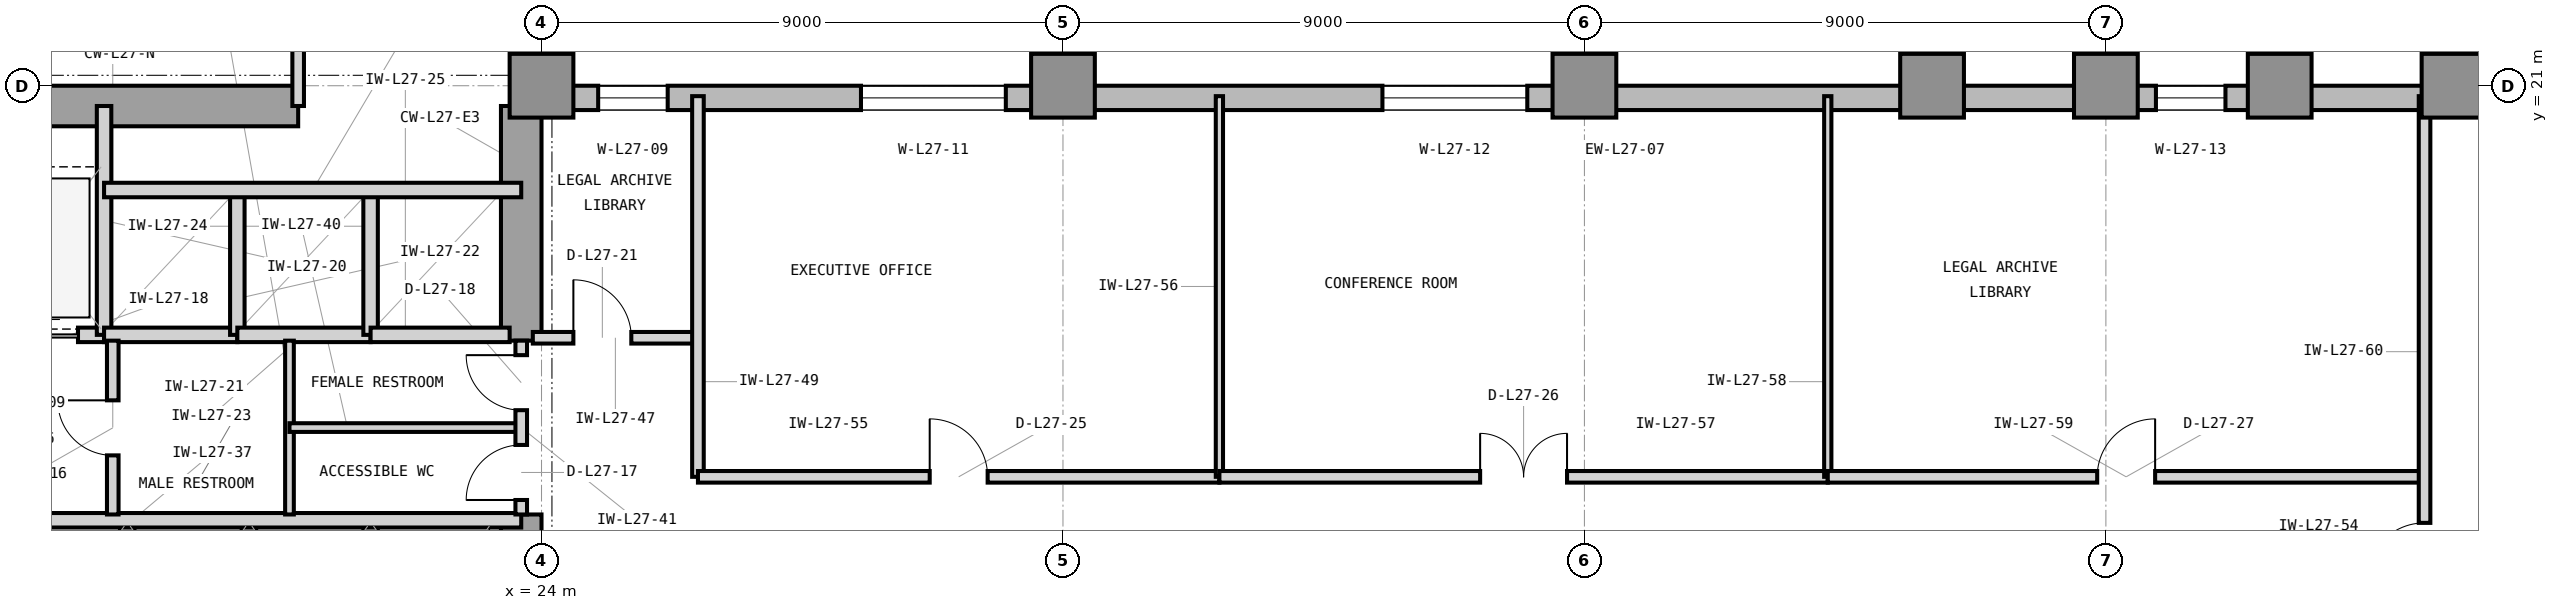
"""IFC4 building model, lengths in metres.
Left out: names, types, materials, properties, quantities, classifications, styles, units other than length and angle.
Written with IfcOpenShell. Run it as: python <this file> out.ifc"""

import sys

from ifc_helpers import new_model, si_unit, direction, frame, frame_2d, origin, origin_2d, place, context, subcontext, project, spatial, rectangle, extrude, element, fill, save


model = new_model("IFC4")
c1 = context("Model", 3, precision=1e-05, world=origin(), true_north=direction((0.0, 1.0)))
c2 = subcontext(c1, "Body", "Model", "MODEL_VIEW")
j1 = project(units=[si_unit("LENGTHUNIT", "METRE"), si_unit("PLANEANGLEUNIT", "RADIAN")], contexts=[c1])
p1 = place(None, origin())
s1 = spatial("IfcSite", under=j1, at=p1, CompositionType="ELEMENT")
p2 = place(p1, origin())
s2 = spatial("IfcBuilding", under=s1, at=p2, CompositionType="ELEMENT")
p3 = place(p2, frame((0.0, 0.0, 116.7)))
s3 = spatial("IfcBuildingStorey", under=s2, at=p3, CompositionType="ELEMENT", Elevation=116.7)
p4 = place(p3, frame((7.475, 20.65, 0.0), z_axis=(0.0, 0.0, 1.0), x_axis=(1.0, 0.0, 0.0)))
e1 = element("IfcWall", 1, at=p4, inside=s3, PredefinedType="SHEAR", context=c2, shape_type="SweptSolid", body=[
    extrude(rectangle(XDim=12.325, YDim=0.7, at=frame_2d((6.163, 0.0))), origin(), (0.0, 0.0, 1.0), 3.9),
])
p5 = place(p3, frame((23.65, 10.4, 0.0), z_axis=(0.0, 0.0, 1.0), x_axis=(0.0, 1.0, 0.0)))
e2 = element("IfcWall", 2, at=p5, inside=s3, PredefinedType="SHEAR", context=c2, shape_type="SweptSolid", body=[
    extrude(rectangle(XDim=3.2, YDim=0.7, at=frame_2d((1.6, 0.0))), origin(), (0.0, 0.0, 1.0), 3.9),
])
p6 = place(p3, frame((23.65, 16.6, 0.0), z_axis=(0.0, 0.0, 1.0), x_axis=(0.0, 1.0, 0.0)))
e3 = element("IfcWall", 3, at=p6, inside=s3, PredefinedType="SHEAR", context=c2, shape_type="SweptSolid", body=[
    extrude(rectangle(XDim=4.05, YDim=0.7, at=frame_2d((2.025, 0.0))), origin(), (0.0, 0.0, 1.0), 3.9),
])
for number, where, z_axis, x_axis in (
    (4, (24.0, 21.0, 0.0), (0.0, 0.0, 1.0), (1.0, 0.0, 0.0)),
    (5, (33.0, 21.0, 0.0), (0.0, 0.0, 1.0), (1.0, 0.0, 0.0)),
    (6, (42.0, 21.0, 0.0), (0.0, 0.0, 1.0), (1.0, 0.0, 0.0)),
    (7, (48.0, 21.0, 0.0), (0.0, 0.0, 1.0), (1.0, 0.0, 0.0)),
    (8, (51.0, 21.0, 0.0), (0.0, 0.0, 1.0), (1.0, 0.0, 0.0)),
    (9, (54.0, 21.0, 0.0), (0.0, 0.0, 1.0), (1.0, 0.0, 0.0)),
    (10, (57.0, 21.0, 0.0), (0.0, 0.0, 1.0), (1.0, 0.0, 0.0)),
):
    element("IfcColumn", number, at=place(p3, frame(where, z_axis=z_axis, x_axis=x_axis)), inside=s3, PredefinedType="COLUMN", context=c2, shape_type="SweptSolid", body=[
        extrude(rectangle(XDim=1.1, YDim=1.1, at=origin_2d()), origin(), (0.0, 0.0, 1.0), 3.9),
    ])
p7 = place(p3, frame((61.4, 20.79, 0.0), z_axis=(0.0, 0.0, 1.0), x_axis=(-1.0, 0.0, 0.0)))
e11 = element("IfcWall", 11, at=p7, inside=s3, PredefinedType="STANDARD", context=c2, shape_type="SweptSolid", body=[
    extrude(rectangle(XDim=37.4, YDim=0.42, at=frame_2d((18.7, 0.0))), origin(), (0.0, 0.0, 1.0), 3.7),
])
p8 = place(p7, frame((35.222, 0.0, 0.85)))
e12 = element("IfcOpeningElement", 12, at=p8, cuts=e11, PredefinedType="OPENING", context=c2, shape_type="SweptSolid", body=[
    extrude(rectangle(XDim=1.2, YDim=2.25, at=frame_2d((0.6, 1.125))), frame((0.0, 0.22, 0.0), z_axis=(0.0, -1.0, 0.0), x_axis=(1.0, 0.0, 0.0)), (0.0, 0.0, 1.0), 0.44),
])
p9 = place(p7, frame((29.386, 0.0, 0.85)))
e13 = element("IfcOpeningElement", 13, at=p9, cuts=e11, PredefinedType="OPENING", context=c2, shape_type="SweptSolid", body=[
    extrude(rectangle(XDim=2.5, YDim=2.25, at=frame_2d((1.25, 1.125))), frame((0.0, 0.22, 0.0), z_axis=(0.0, -1.0, 0.0), x_axis=(1.0, 0.0, 0.0)), (0.0, 0.0, 1.0), 0.44),
])
p10 = place(p7, frame((20.386, 0.0, 0.85)))
e14 = element("IfcOpeningElement", 14, at=p10, cuts=e11, PredefinedType="OPENING", context=c2, shape_type="SweptSolid", body=[
    extrude(rectangle(XDim=2.5, YDim=2.25, at=frame_2d((1.25, 1.125))), frame((0.0, 0.22, 0.0), z_axis=(0.0, -1.0, 0.0), x_axis=(1.0, 0.0, 0.0)), (0.0, 0.0, 1.0), 0.44),
])
p11 = place(p7, frame((8.336, 0.0, 0.85)))
e15 = element("IfcOpeningElement", 15, at=p11, cuts=e11, PredefinedType="OPENING", context=c2, shape_type="SweptSolid", body=[
    extrude(rectangle(XDim=1.2, YDim=2.25, at=frame_2d((0.6, 1.125))), frame((0.0, 0.22, 0.0), z_axis=(0.0, -1.0, 0.0), x_axis=(1.0, 0.0, 0.0)), (0.0, 0.0, 1.0), 0.44),
])
p12 = place(p3, frame((23.79, 21.0, 0.0), z_axis=(0.0, 0.0, 1.0), x_axis=(0.0, 1.0, 0.0)))
e16 = element("IfcWall", 16, at=p12, inside=s3, PredefinedType="STANDARD", context=c2, shape_type="SweptSolid", body=[
    extrude(rectangle(XDim=25.4, YDim=0.42, at=frame_2d((12.7, 0.0))), origin(), (0.0, 0.0, 1.0), 3.7),
])
p13 = place(p12, frame((11.45, 0.0, 0.85)))
e17 = element("IfcOpeningElement", 17, at=p13, cuts=e16, PredefinedType="OPENING", context=c2, shape_type="SweptSolid", body=[
    extrude(rectangle(XDim=2.5, YDim=2.25, at=frame_2d((1.25, 1.125))), frame((0.0, 0.22, 0.0), z_axis=(0.0, -1.0, 0.0), x_axis=(1.0, 0.0, 0.0)), (0.0, 0.0, 1.0), 0.44),
])
p14 = place(p3, frame((14.15, 16.7, 0.0), z_axis=(0.0, 0.0, 1.0), x_axis=(1.0, 0.0, 0.0)))
e18 = element("IfcWall", 18, at=p14, inside=s3, PredefinedType="PARTITIONING", context=c2, shape_type="SweptSolid", body=[
    extrude(rectangle(XDim=2.3, YDim=0.25, at=frame_2d((1.15, 0.0))), origin(), (0.0, 0.0, 1.0), 3.227),
])
p15 = place(p14, frame((0.45, 0.0, 0.0)))
e19 = element("IfcOpeningElement", 19, at=p15, cuts=e18, PredefinedType="OPENING", context=c2, shape_type="SweptSolid", body=[
    extrude(rectangle(XDim=1.4, YDim=2.35, at=frame_2d((0.7, 1.175))), frame((0.0, 0.135, 0.0), z_axis=(0.0, -1.0, 0.0), x_axis=(1.0, 0.0, 0.0)), (0.0, 0.0, 1.0), 0.27),
])
p16 = place(p3, frame((16.45, 16.7, 0.0), z_axis=(0.0, 0.0, 1.0), x_axis=(0.0, 1.0, 0.0)))
e20 = element("IfcWall", 20, at=p16, inside=s3, PredefinedType="PARTITIONING", context=c2, shape_type="SweptSolid", body=[
    extrude(rectangle(XDim=3.95, YDim=0.25, at=frame_2d((1.975, 0.0))), origin(), (0.0, 0.0, 1.0), 3.69),
])
p17 = place(p3, frame((16.45, 16.7, 0.0), z_axis=(0.0, 0.0, 1.0), x_axis=(1.0, 0.0, 0.0)))
e21 = element("IfcWall", 21, at=p17, inside=s3, PredefinedType="PARTITIONING", context=c2, shape_type="SweptSolid", body=[
    extrude(rectangle(XDim=2.3, YDim=0.25, at=frame_2d((1.15, 0.0))), origin(), (0.0, 0.0, 1.0), 3.227),
])
p18 = place(p3, frame((18.75, 16.7, 0.0), z_axis=(0.0, 0.0, 1.0), x_axis=(0.0, 1.0, 0.0)))
e22 = element("IfcWall", 22, at=p18, inside=s3, PredefinedType="PARTITIONING", context=c2, shape_type="SweptSolid", body=[
    extrude(rectangle(XDim=2.5, YDim=0.25, at=frame_2d((1.25, 0.0))), origin(), (0.0, 0.0, 1.0), 3.69),
])
p19 = place(p3, frame((18.75, 16.7, 0.0), z_axis=(0.0, 0.0, 1.0), x_axis=(1.0, 0.0, 0.0)))
e23 = element("IfcWall", 23, at=p19, inside=s3, PredefinedType="PARTITIONING", context=c2, shape_type="SweptSolid", body=[
    extrude(rectangle(XDim=2.3, YDim=0.25, at=frame_2d((1.15, 0.0))), origin(), (0.0, 0.0, 1.0), 3.227),
])
p20 = place(p3, frame((21.05, 16.7, 0.0), z_axis=(0.0, 0.0, 1.0), x_axis=(0.0, 1.0, 0.0)))
e24 = element("IfcWall", 24, at=p20, inside=s3, PredefinedType="PARTITIONING", context=c2, shape_type="SweptSolid", body=[
    extrude(rectangle(XDim=2.5, YDim=0.25, at=frame_2d((1.25, 0.0))), origin(), (0.0, 0.0, 1.0), 3.69),
])
p21 = place(p3, frame((21.05, 16.7, 0.0), z_axis=(0.0, 0.0, 1.0), x_axis=(1.0, 0.0, 0.0)))
e25 = element("IfcWall", 25, at=p21, inside=s3, PredefinedType="PARTITIONING", context=c2, shape_type="SweptSolid", body=[
    extrude(rectangle(XDim=2.4, YDim=0.25, at=frame_2d((1.2, 0.0))), origin(), (0.0, 0.0, 1.0), 3.227),
])
p22 = place(p3, frame((16.45, 19.2, 0.0), z_axis=(0.0, 0.0, 1.0), x_axis=(1.0, 0.0, 0.0)))
e26 = element("IfcWall", 26, at=p22, inside=s3, PredefinedType="PARTITIONING", context=c2, shape_type="SweptSolid", body=[
    extrude(rectangle(XDim=7.2, YDim=0.25, at=frame_2d((3.6, 0.0))), origin(), (0.0, 0.0, 1.0), 3.69),
])
for number, where, z_axis, x_axis in (
    (27, (16.85, 10.5, 0.0), (0.0, 0.0, 1.0), (0.0, 1.0, 0.0)),
    (28, (18.95, 10.5, 0.0), (0.0, 0.0, 1.0), (0.0, 1.0, 0.0)),
    (29, (21.05, 10.5, 0.0), (0.0, 0.0, 1.0), (0.0, 1.0, 0.0)),
):
    element("IfcWall", number, at=place(p3, frame(where, z_axis=z_axis, x_axis=x_axis)), inside=s3, PredefinedType="PARTITIONING", context=c2, shape_type="SweptSolid", body=[
        extrude(rectangle(XDim=3.0, YDim=0.25, at=frame_2d((1.5, 0.0))), origin(), (0.0, 0.0, 1.0), 3.69),
    ])
p23 = place(p3, frame((14.7, 13.5, 0.0), z_axis=(0.0, 0.0, 1.0), x_axis=(1.0, 0.0, 0.0)))
e30 = element("IfcWall", 30, at=p23, inside=s3, PredefinedType="PARTITIONING", context=c2, shape_type="SweptSolid", body=[
    extrude(rectangle(XDim=8.95, YDim=0.25, at=frame_2d((4.475, 0.0))), origin(), (0.0, 0.0, 1.0), 3.227),
])
p24 = place(p3, frame((16.6, 13.6, 0.0), z_axis=(0.0, 0.0, 1.0), x_axis=(0.0, 1.0, 0.0)))
e31 = element("IfcWall", 31, at=p24, inside=s3, PredefinedType="PARTITIONING", context=c2, shape_type="SweptSolid", body=[
    extrude(rectangle(XDim=3.0, YDim=0.2, at=frame_2d((1.5, 0.0))), origin(), (0.0, 0.0, 1.0), 3.69),
])
p25 = place(p24, frame((1.02, 0.0, 0.0)))
e32 = element("IfcOpeningElement", 32, at=p25, cuts=e31, PredefinedType="OPENING", context=c2, shape_type="SweptSolid", body=[
    extrude(rectangle(XDim=0.95, YDim=2.1, at=frame_2d((0.475, 1.05))), frame((0.0, 0.11, 0.0), z_axis=(0.0, -1.0, 0.0), x_axis=(1.0, 0.0, 0.0)), (0.0, 0.0, 1.0), 0.22),
])
p26 = place(p3, frame((19.65, 13.6, 0.0), z_axis=(0.0, 0.0, 1.0), x_axis=(0.0, 1.0, 0.0)))
e33 = element("IfcWall", 33, at=p26, inside=s3, PredefinedType="PARTITIONING", context=c2, shape_type="SweptSolid", body=[
    extrude(rectangle(XDim=3.0, YDim=0.15, at=frame_2d((1.5, 0.0))), origin(), (0.0, 0.0, 1.0), 3.69),
])
p27 = place(p3, frame((19.65, 15.1, 0.0), z_axis=(0.0, 0.0, 1.0), x_axis=(1.0, 0.0, 0.0)))
e34 = element("IfcWall", 34, at=p27, inside=s3, PredefinedType="PARTITIONING", context=c2, shape_type="SweptSolid", body=[
    extrude(rectangle(XDim=4.0, YDim=0.15, at=frame_2d((2.0, 0.0))), origin(), (0.0, 0.0, 1.0), 3.69),
])
p28 = place(p3, frame((23.65, 13.6, 0.0), z_axis=(0.0, 0.0, 1.0), x_axis=(0.0, 1.0, 0.0)))
e35 = element("IfcWall", 35, at=p28, inside=s3, PredefinedType="PARTITIONING", context=c2, shape_type="SweptSolid", body=[
    extrude(rectangle(XDim=3.0, YDim=0.2, at=frame_2d((1.5, 0.0))), origin(), (0.0, 0.0, 1.0), 3.69),
])
p29 = place(p28, frame((0.25, 0.0, 0.0)))
e36 = element("IfcOpeningElement", 36, at=p29, cuts=e35, PredefinedType="OPENING", context=c2, shape_type="SweptSolid", body=[
    extrude(rectangle(XDim=0.95, YDim=2.1, at=frame_2d((0.475, 1.05))), frame((0.0, 0.11, 0.0), z_axis=(0.0, -1.0, 0.0), x_axis=(1.0, 0.0, 0.0)), (0.0, 0.0, 1.0), 0.22),
])
p30 = place(p28, frame((1.8, 0.0, 0.0)))
e37 = element("IfcOpeningElement", 37, at=p30, cuts=e35, PredefinedType="OPENING", context=c2, shape_type="SweptSolid", body=[
    extrude(rectangle(XDim=0.95, YDim=2.1, at=frame_2d((0.475, 1.05))), frame((0.0, 0.11, 0.0), z_axis=(0.0, -1.0, 0.0), x_axis=(1.0, 0.0, 0.0)), (0.0, 0.0, 1.0), 0.22),
])
p31 = place(p3, frame((23.85, 16.65, 0.0), z_axis=(0.0, 0.0, 1.0), x_axis=(1.0, 0.0, 0.0)))
e38 = element("IfcWall", 38, at=p31, inside=s3, PredefinedType="PARTITIONING", context=c2, shape_type="SweptSolid", body=[
    extrude(rectangle(XDim=2.85, YDim=0.2, at=frame_2d((1.425, 0.0))), origin(), (0.0, 0.0, 1.0), 3.69),
])
p32 = place(p31, frame((0.7, 0.0, 0.0)))
e39 = element("IfcOpeningElement", 39, at=p32, cuts=e38, PredefinedType="OPENING", context=c2, shape_type="SweptSolid", body=[
    extrude(rectangle(XDim=1.0, YDim=2.15, at=frame_2d((0.5, 1.075))), frame((0.0, 0.11, 0.0), z_axis=(0.0, -1.0, 0.0), x_axis=(1.0, 0.0, 0.0)), (0.0, 0.0, 1.0), 0.22),
])
p33 = place(p3, frame((26.7, 14.25, 0.0), z_axis=(0.0, 0.0, 1.0), x_axis=(0.0, 1.0, 0.0)))
e40 = element("IfcWall", 40, at=p33, inside=s3, PredefinedType="PARTITIONING", context=c2, shape_type="SweptSolid", body=[
    extrude(rectangle(XDim=6.57, YDim=0.2, at=frame_2d((3.285, 0.0))), origin(), (0.0, 0.0, 1.0), 3.69),
])
p34 = place(p3, frame((26.7, 14.25, 0.0), z_axis=(0.0, 0.0, 1.0), x_axis=(1.0, 0.0, 0.0)))
e41 = element("IfcWall", 41, at=p34, inside=s3, PredefinedType="PARTITIONING", context=c2, shape_type="SweptSolid", body=[
    extrude(rectangle(XDim=9.0, YDim=0.2, at=frame_2d((4.5, 0.0))), origin(), (0.0, 0.0, 1.0), 3.69),
])
p35 = place(p34, frame((4.0, 0.0, 0.0)))
e42 = element("IfcOpeningElement", 42, at=p35, cuts=e41, PredefinedType="OPENING", context=c2, shape_type="SweptSolid", body=[
    extrude(rectangle(XDim=1.0, YDim=2.15, at=frame_2d((0.5, 1.075))), frame((0.0, 0.11, 0.0), z_axis=(0.0, -1.0, 0.0), x_axis=(1.0, 0.0, 0.0)), (0.0, 0.0, 1.0), 0.22),
])
p36 = place(p3, frame((35.7, 14.25, 0.0), z_axis=(0.0, 0.0, 1.0), x_axis=(0.0, 1.0, 0.0)))
e43 = element("IfcWall", 43, at=p36, inside=s3, PredefinedType="PARTITIONING", context=c2, shape_type="SweptSolid", body=[
    extrude(rectangle(XDim=6.57, YDim=0.125, at=frame_2d((3.285, 0.0))), origin(), (0.0, 0.0, 1.0), 3.69),
])
p37 = place(p3, frame((35.7, 14.25, 0.0), z_axis=(0.0, 0.0, 1.0), x_axis=(1.0, 0.0, 0.0)))
e44 = element("IfcWall", 44, at=p37, inside=s3, PredefinedType="PARTITIONING", context=c2, shape_type="SweptSolid", body=[
    extrude(rectangle(XDim=10.5, YDim=0.2, at=frame_2d((5.25, 0.0))), origin(), (0.0, 0.0, 1.0), 3.69),
])
p38 = place(p37, frame((4.5, 0.0, 0.0)))
e45 = element("IfcOpeningElement", 45, at=p38, cuts=e44, PredefinedType="OPENING", context=c2, shape_type="SweptSolid", body=[
    extrude(rectangle(XDim=1.5, YDim=2.3, at=frame_2d((0.75, 1.15))), frame((0.0, 0.11, 0.0), z_axis=(0.0, -1.0, 0.0), x_axis=(1.0, 0.0, 0.0)), (0.0, 0.0, 1.0), 0.22),
])
p39 = place(p3, frame((46.2, 14.25, 0.0), z_axis=(0.0, 0.0, 1.0), x_axis=(0.0, 1.0, 0.0)))
e46 = element("IfcWall", 46, at=p39, inside=s3, PredefinedType="PARTITIONING", context=c2, shape_type="SweptSolid", body=[
    extrude(rectangle(XDim=6.57, YDim=0.125, at=frame_2d((3.285, 0.0))), origin(), (0.0, 0.0, 1.0), 3.69),
])
p40 = place(p3, frame((46.2, 14.25, 0.0), z_axis=(0.0, 0.0, 1.0), x_axis=(1.0, 0.0, 0.0)))
e47 = element("IfcWall", 47, at=p40, inside=s3, PredefinedType="PARTITIONING", context=c2, shape_type="SweptSolid", body=[
    extrude(rectangle(XDim=10.3, YDim=0.2, at=frame_2d((5.15, 0.0))), origin(), (0.0, 0.0, 1.0), 3.69),
])
p41 = place(p40, frame((4.65, 0.0, 0.0)))
e48 = element("IfcOpeningElement", 48, at=p41, cuts=e47, PredefinedType="OPENING", context=c2, shape_type="SweptSolid", body=[
    extrude(rectangle(XDim=1.0, YDim=2.15, at=frame_2d((0.5, 1.075))), frame((0.0, 0.11, 0.0), z_axis=(0.0, -1.0, 0.0), x_axis=(1.0, 0.0, 0.0)), (0.0, 0.0, 1.0), 0.22),
])
p42 = place(p3, frame((56.5, 3.18, 0.0), z_axis=(0.0, 0.0, 1.0), x_axis=(0.0, 1.0, 0.0)))
e49 = element("IfcWall", 49, at=p42, inside=s3, PredefinedType="PARTITIONING", context=c2, shape_type="SweptSolid", body=[
    extrude(rectangle(XDim=17.64, YDim=0.2, at=frame_2d((8.82, 0.0))), origin(), (0.0, 0.0, 1.0), 3.69),
])
p43 = place(p42, frame((9.275, 0.0, 0.0)))
e50 = element("IfcOpeningElement", 50, at=p43, cuts=e49, PredefinedType="OPENING", context=c2, shape_type="SweptSolid", body=[
    extrude(rectangle(XDim=1.0, YDim=2.15, at=frame_2d((0.5, 1.075))), frame((0.0, 0.11, 0.0), z_axis=(0.0, -1.0, 0.0), x_axis=(1.0, 0.0, 0.0)), (0.0, 0.0, 1.0), 0.22),
])
p44 = place(p3, frame((19.8, 20.65, 0.0), z_axis=(0.0, 0.0, 1.0), x_axis=(0.0, 1.0, 0.0)))
e51 = element("IfcWall", 51, at=p44, inside=s3, PredefinedType="PARTITIONING", context=c2, shape_type="SweptSolid", body=[
    extrude(rectangle(XDim=6.15, YDim=0.2, at=frame_2d((3.075, 0.0))), origin(), (0.0, 0.0, 1.0), 3.69),
])
p45 = place(p15, origin())
e52 = element("IfcDoor", 52, at=p45, inside=s3, OperationType="DOUBLE_DOOR_SLIDING", PredefinedType="DOOR", context=c2, shape_type="SweptSolid", body=[
    extrude(rectangle(XDim=1.4, YDim=2.35, at=frame_2d((0.7, 1.175))), frame((0.0, 0.025, 0.0), z_axis=(0.0, -1.0, 0.0), x_axis=(1.0, 0.0, 0.0)), (0.0, 0.0, 1.0), 0.05),
])
fill(e19, e52)
p46 = place(p25, origin())
e53 = element("IfcDoor", 53, at=p46, inside=s3, OperationType="SINGLE_SWING_RIGHT", PredefinedType="DOOR", context=c2, shape_type="SweptSolid", body=[
    extrude(rectangle(XDim=0.95, YDim=2.1, at=frame_2d((0.475, 1.05))), frame((0.0, 0.025, 0.0), z_axis=(0.0, -1.0, 0.0), x_axis=(1.0, 0.0, 0.0)), (0.0, 0.0, 1.0), 0.05),
])
fill(e32, e53)
p47 = place(p29, origin())
e54 = element("IfcDoor", 54, at=p47, inside=s3, OperationType="SINGLE_SWING_LEFT", PredefinedType="DOOR", context=c2, shape_type="SweptSolid", body=[
    extrude(rectangle(XDim=0.95, YDim=2.1, at=frame_2d((0.475, 1.05))), frame((0.0, 0.025, 0.0), z_axis=(0.0, -1.0, 0.0), x_axis=(1.0, 0.0, 0.0)), (0.0, 0.0, 1.0), 0.05),
])
fill(e36, e54)
p48 = place(p30, origin())
e55 = element("IfcDoor", 55, at=p48, inside=s3, OperationType="SINGLE_SWING_RIGHT", PredefinedType="DOOR", context=c2, shape_type="SweptSolid", body=[
    extrude(rectangle(XDim=0.95, YDim=2.1, at=frame_2d((0.475, 1.05))), frame((0.0, 0.025, 0.0), z_axis=(0.0, -1.0, 0.0), x_axis=(1.0, 0.0, 0.0)), (0.0, 0.0, 1.0), 0.05),
])
fill(e37, e55)
p49 = place(p32, origin())
e56 = element("IfcDoor", 56, at=p49, inside=s3, OperationType="SINGLE_SWING_LEFT", PredefinedType="DOOR", context=c2, shape_type="SweptSolid", body=[
    extrude(rectangle(XDim=1.0, YDim=2.15, at=frame_2d((0.5, 1.075))), frame((0.0, 0.025, 0.0), z_axis=(0.0, -1.0, 0.0), x_axis=(1.0, 0.0, 0.0)), (0.0, 0.0, 1.0), 0.05),
])
fill(e39, e56)
p50 = place(p35, origin())
e57 = element("IfcDoor", 57, at=p50, inside=s3, OperationType="SINGLE_SWING_LEFT", PredefinedType="DOOR", context=c2, shape_type="SweptSolid", body=[
    extrude(rectangle(XDim=1.0, YDim=2.15, at=frame_2d((0.5, 1.075))), frame((0.0, 0.025, 0.0), z_axis=(0.0, -1.0, 0.0), x_axis=(1.0, 0.0, 0.0)), (0.0, 0.0, 1.0), 0.05),
])
fill(e42, e57)
p51 = place(p38, origin())
e58 = element("IfcDoor", 58, at=p51, inside=s3, OperationType="DOUBLE_DOOR_SINGLE_SWING", PredefinedType="DOOR", context=c2, shape_type="SweptSolid", body=[
    extrude(rectangle(XDim=1.5, YDim=2.3, at=frame_2d((0.75, 1.15))), frame((0.0, 0.025, 0.0), z_axis=(0.0, -1.0, 0.0), x_axis=(1.0, 0.0, 0.0)), (0.0, 0.0, 1.0), 0.05),
])
fill(e45, e58)
p52 = place(p41, origin())
e59 = element("IfcDoor", 59, at=p52, inside=s3, OperationType="SINGLE_SWING_RIGHT", PredefinedType="DOOR", context=c2, shape_type="SweptSolid", body=[
    extrude(rectangle(XDim=1.0, YDim=2.15, at=frame_2d((0.5, 1.075))), frame((0.0, 0.025, 0.0), z_axis=(0.0, -1.0, 0.0), x_axis=(1.0, 0.0, 0.0)), (0.0, 0.0, 1.0), 0.05),
])
fill(e48, e59)
p53 = place(p43, origin())
e60 = element("IfcDoor", 60, at=p53, inside=s3, OperationType="SINGLE_SWING_LEFT", PredefinedType="DOOR", context=c2, shape_type="SweptSolid", body=[
    extrude(rectangle(XDim=1.0, YDim=2.15, at=frame_2d((0.5, 1.075))), frame((0.0, 0.025, 0.0), z_axis=(0.0, -1.0, 0.0), x_axis=(1.0, 0.0, 0.0)), (0.0, 0.0, 1.0), 0.05),
])
fill(e50, e60)
p54 = place(p8, origin())
e61 = element("IfcWindow", 61, at=p54, inside=s3, PartitioningType="SINGLE_PANEL", PredefinedType="WINDOW", context=c2, shape_type="SweptSolid", body=[
    extrude(rectangle(XDim=1.2, YDim=2.25, at=frame_2d((0.6, 1.125))), frame((0.0, 0.11, 0.0), z_axis=(0.0, -1.0, 0.0), x_axis=(1.0, 0.0, 0.0)), (0.0, 0.0, 1.0), 0.06),
])
fill(e12, e61)
p55 = place(p9, origin())
e62 = element("IfcWindow", 62, at=p55, inside=s3, PartitioningType="SINGLE_PANEL", PredefinedType="WINDOW", context=c2, shape_type="SweptSolid", body=[
    extrude(rectangle(XDim=2.5, YDim=2.25, at=frame_2d((1.25, 1.125))), frame((0.0, 0.11, 0.0), z_axis=(0.0, -1.0, 0.0), x_axis=(1.0, 0.0, 0.0)), (0.0, 0.0, 1.0), 0.06),
])
fill(e13, e62)
p56 = place(p10, origin())
e63 = element("IfcWindow", 63, at=p56, inside=s3, PartitioningType="SINGLE_PANEL", PredefinedType="WINDOW", context=c2, shape_type="SweptSolid", body=[
    extrude(rectangle(XDim=2.5, YDim=2.25, at=frame_2d((1.25, 1.125))), frame((0.0, 0.11, 0.0), z_axis=(0.0, -1.0, 0.0), x_axis=(1.0, 0.0, 0.0)), (0.0, 0.0, 1.0), 0.06),
])
fill(e14, e63)
p57 = place(p11, origin())
e64 = element("IfcWindow", 64, at=p57, inside=s3, PartitioningType="SINGLE_PANEL", PredefinedType="WINDOW", context=c2, shape_type="SweptSolid", body=[
    extrude(rectangle(XDim=1.2, YDim=2.25, at=frame_2d((0.6, 1.125))), frame((0.0, 0.11, 0.0), z_axis=(0.0, -1.0, 0.0), x_axis=(1.0, 0.0, 0.0)), (0.0, 0.0, 1.0), 0.06),
])
fill(e15, e64)
save(model, sys.argv[1])
